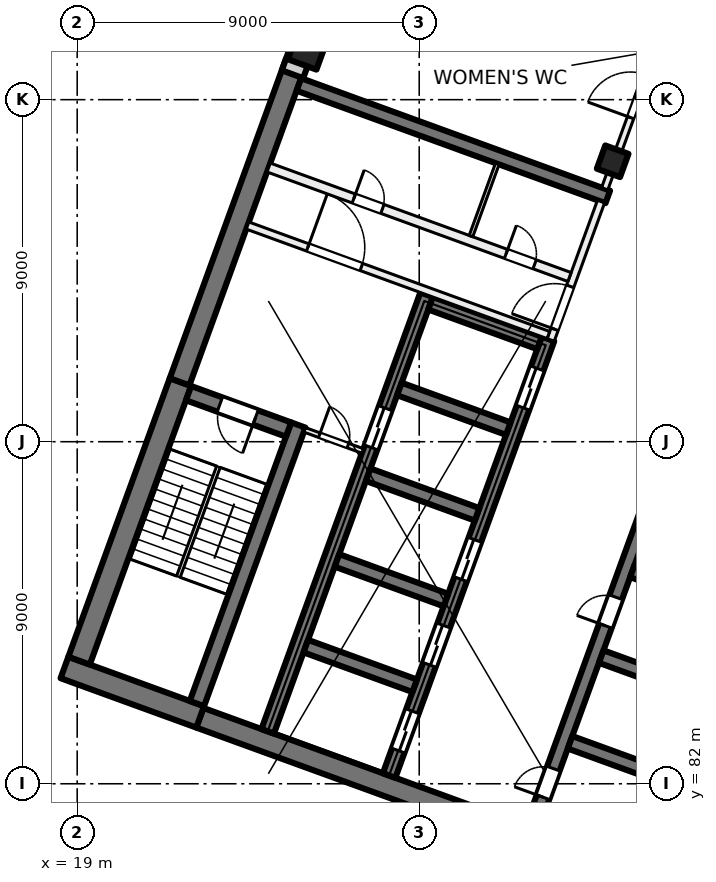
"""IFC4 building model, lengths in metres.
Left out: names, types, materials, properties, quantities, classifications, styles, units other than length and angle.
Written with IfcOpenShell. Run it as: python <this file> out.ifc"""

import sys

from ifc_helpers import new_model, si_unit, direction, frame, frame_2d, origin, origin_2d, place, context, subcontext, project, spatial, rectangle, extrude, element, fill, save


model = new_model("IFC4")
c1 = context("Model", 3, precision=1e-05, world=origin(), true_north=direction((0.0, 1.0)))
c2 = subcontext(c1, "Body", "Model", "MODEL_VIEW")
j1 = project(units=[si_unit("LENGTHUNIT", "METRE"), si_unit("PLANEANGLEUNIT", "RADIAN")], contexts=[c1])
p1 = place(None, origin())
s1 = spatial("IfcSite", under=j1, at=p1, CompositionType="ELEMENT")
p2 = place(p1, origin())
s2 = spatial("IfcBuilding", under=s1, at=p2, CompositionType="ELEMENT")
p3 = place(p2, frame((0.0, 0.0, 150.5)))
s3 = spatial("IfcBuildingStorey", under=s2, at=p3, CompositionType="ELEMENT", Elevation=150.5)
p4 = place(p3, frame((33.091, 98.379, 0.0), z_axis=(0.0, 0.0, 1.0), x_axis=(-0.342020143326, -0.939692620786, 0.0)))
e1 = element("IfcColumn", 1, at=p4, inside=s3, PredefinedType="COLUMN", context=c2, shape_type="SweptSolid", body=[
    extrude(rectangle(XDim=0.65, YDim=0.65, at=origin_2d()), origin(), (0.0, 0.0, 1.0), 4.0),
])
p5 = place(p3, frame((25.056, 101.303, 0.0), z_axis=(0.0, 0.0, 1.0), x_axis=(-0.342020143326, -0.939692620786, 0.0)))
e2 = element("IfcColumn", 2, at=p5, inside=s3, PredefinedType="COLUMN", context=c2, shape_type="SweptSolid", body=[
    extrude(rectangle(XDim=0.8, YDim=0.8, at=origin_2d()), origin(), (0.0, 0.0, 1.0), 4.0),
])
p6 = place(p3, frame((35.759, 78.811, 0.0), z_axis=(0.0, 0.0, 1.0), x_axis=(-0.939692894512, 0.342019391267, 0.0)))
e3 = element("IfcWall", 3, at=p6, inside=s3, PredefinedType="SHEAR", context=c2, shape_type="SweptSolid", body=[
    extrude(rectangle(XDim=14.4, YDim=0.55, at=frame_2d((7.2, 0.0))), origin(), (0.0, 0.0, 1.0), 4.0),
])
p7 = place(p3, frame((22.236, 83.76, 0.0), z_axis=(0.0, 0.0, 1.0), x_axis=(-0.939680822529, 0.342052557032, 0.0)))
e4 = element("IfcWall", 4, at=p7, inside=s3, PredefinedType="SHEAR", context=c2, shape_type="SweptSolid", body=[
    extrude(rectangle(XDim=3.8, YDim=0.6, at=frame_2d((1.9, 0.0))), origin(), (0.0, 0.0, 1.0), 4.0),
])
p8 = place(p3, frame((19.05, 85.239, 0.0), z_axis=(0.0, 0.0, 1.0), x_axis=(0.342016982193, 0.939693771338, 0.0)))
e5 = element("IfcWall", 5, at=p8, inside=s3, PredefinedType="SHEAR", context=c2, shape_type="SweptSolid", body=[
    extrude(rectangle(XDim=7.8, YDim=0.6, at=frame_2d((3.9, 0.0))), origin(), (0.0, 0.0, 1.0), 4.0),
])
p9 = place(p3, frame((21.694, 92.577, 0.0), z_axis=(0.0, 0.0, 1.0), x_axis=(0.342010253184, 0.939696220444, 0.0)))
e6 = element("IfcWall", 6, at=p9, inside=s3, PredefinedType="SHEAR", context=c2, shape_type="SweptSolid", body=[
    extrude(rectangle(XDim=8.95, YDim=0.55, at=frame_2d((4.475, 0.0))), origin(), (0.0, 0.0, 1.0), 4.0),
])
p10 = place(p3, frame((22.15, 84.11, 0.0), z_axis=(0.0, 0.0, 1.0), x_axis=(0.342016982193, 0.939693771338, 0.0)))
e7 = element("IfcWall", 7, at=p10, inside=s3, PredefinedType="SHEAR", context=c2, shape_type="SweptSolid", body=[
    extrude(rectangle(XDim=7.8, YDim=0.4, at=frame_2d((3.9, 0.0))), origin(), (0.0, 0.0, 1.0), 4.0),
])
p11 = place(p3, frame((24.562, 91.32, 0.0), z_axis=(0.0, 0.0, 1.0), x_axis=(-0.939717030584, 0.341953070509, 0.0)))
e8 = element("IfcWall", 8, at=p11, inside=s3, PredefinedType="SHEAR", context=c2, shape_type="SweptSolid", body=[
    extrude(rectangle(XDim=2.8, YDim=0.4, at=frame_2d((1.4, 0.0))), origin(), (0.0, 0.0, 1.0), 4.0),
])
p12 = place(p11, frame((0.925, 0.0, 0.0)))
e9 = element("IfcOpeningElement", 9, at=p12, cuts=e8, PredefinedType="OPENING", context=c2, shape_type="SweptSolid", body=[
    extrude(rectangle(XDim=1.0, YDim=2.1, at=frame_2d((0.5, 1.05))), frame((0.0, 0.21, 0.0), z_axis=(0.0, -1.0, 0.0), x_axis=(1.0, 0.0, 0.0)), (0.0, 0.0, 1.0), 0.42),
])
p13 = place(p3, frame((30.967, 80.848, 0.0), z_axis=(0.0, 0.0, 1.0), x_axis=(0.34201563943, 0.939694260058, 0.0)))
e10 = element("IfcWall", 10, at=p13, inside=s3, PredefinedType="SHEAR", context=c2, shape_type="SweptSolid", body=[
    extrude(rectangle(XDim=12.225, YDim=0.35, at=frame_2d((6.113, 0.0))), origin(), (0.0, 0.0, 1.0), 4.0),
])
p14 = place(p13, frame((0.85, 0.0, 0.0)))
e11 = element("IfcOpeningElement", 11, at=p14, cuts=e10, PredefinedType="OPENING", context=c2, shape_type="SweptSolid", body=[
    extrude(rectangle(XDim=0.8, YDim=2.1, at=frame_2d((0.4, 1.05))), frame((0.0, 0.185, 0.0), z_axis=(0.0, -1.0, 0.0), x_axis=(1.0, 0.0, 0.0)), (0.0, 0.0, 1.0), 0.37),
])
p15 = place(p13, frame((5.65, 0.0, 0.0)))
e12 = element("IfcOpeningElement", 12, at=p15, cuts=e10, PredefinedType="OPENING", context=c2, shape_type="SweptSolid", body=[
    extrude(rectangle(XDim=0.8, YDim=2.1, at=frame_2d((0.4, 1.05))), frame((0.0, 0.185, 0.0), z_axis=(0.0, -1.0, 0.0), x_axis=(1.0, 0.0, 0.0)), (0.0, 0.0, 1.0), 0.37),
])
p16 = place(p3, frame((34.835, 82.047, 0.0), z_axis=(0.0, 0.0, 1.0), x_axis=(-0.939683528043, 0.3420451244, 0.0)))
e13 = element("IfcWall", 13, at=p16, inside=s3, PredefinedType="SHEAR", context=c2, shape_type="SweptSolid", body=[
    extrude(rectangle(XDim=3.05, YDim=0.35, at=frame_2d((1.525, 0.0))), origin(), (0.0, 0.0, 1.0), 4.0),
])
p17 = place(p3, frame((35.656, 84.303, 0.0), z_axis=(0.0, 0.0, 1.0), x_axis=(-0.939709254651, 0.341974438698, 0.0)))
e14 = element("IfcWall", 14, at=p17, inside=s3, PredefinedType="SHEAR", context=c2, shape_type="SweptSolid", body=[
    extrude(rectangle(XDim=3.05, YDim=0.35, at=frame_2d((1.525, 0.0))), origin(), (0.0, 0.0, 1.0), 4.0),
])
p18 = place(p3, frame((36.477, 86.558, 0.0), z_axis=(0.0, 0.0, 1.0), x_axis=(-0.939683528043, 0.3420451244, 0.0)))
e15 = element("IfcWall", 15, at=p18, inside=s3, PredefinedType="SHEAR", context=c2, shape_type="SweptSolid", body=[
    extrude(rectangle(XDim=3.05, YDim=0.35, at=frame_2d((1.525, 0.0))), origin(), (0.0, 0.0, 1.0), 4.0),
])
p19 = place(p3, frame((27.208, 82.216, 0.0), z_axis=(0.0, 0.0, 1.0), x_axis=(0.34201563943, 0.939694260058, 0.0)))
e16 = element("IfcWall", 16, at=p19, inside=s3, PredefinedType="SHEAR", context=c2, shape_type="SweptSolid", body=[
    extrude(rectangle(XDim=12.225, YDim=0.35, at=frame_2d((6.113, 0.0))), origin(), (0.0, 0.0, 1.0), 4.0),
])
p20 = place(p19, frame((0.7, 0.0, 0.0)))
e17 = element("IfcOpeningElement", 17, at=p20, cuts=e16, PredefinedType="OPENING", context=c2, shape_type="SweptSolid", body=[
    extrude(rectangle(XDim=1.1, YDim=2.1, at=frame_2d((0.55, 1.05))), frame((0.0, 0.185, 0.0), z_axis=(0.0, -1.0, 0.0), x_axis=(1.0, 0.0, 0.0)), (0.0, 0.0, 1.0), 0.37),
])
p21 = place(p19, frame((3.1, 0.0, 0.0)))
e18 = element("IfcOpeningElement", 18, at=p21, cuts=e16, PredefinedType="OPENING", context=c2, shape_type="SweptSolid", body=[
    extrude(rectangle(XDim=1.1, YDim=2.1, at=frame_2d((0.55, 1.05))), frame((0.0, 0.185, 0.0), z_axis=(0.0, -1.0, 0.0), x_axis=(1.0, 0.0, 0.0)), (0.0, 0.0, 1.0), 0.37),
])
p22 = place(p19, frame((5.5, 0.0, 0.0)))
e19 = element("IfcOpeningElement", 19, at=p22, cuts=e16, PredefinedType="OPENING", context=c2, shape_type="SweptSolid", body=[
    extrude(rectangle(XDim=1.1, YDim=2.1, at=frame_2d((0.55, 1.05))), frame((0.0, 0.185, 0.0), z_axis=(0.0, -1.0, 0.0), x_axis=(1.0, 0.0, 0.0)), (0.0, 0.0, 1.0), 0.37),
])
p23 = place(p19, frame((10.3, 0.0, 0.0)))
e20 = element("IfcOpeningElement", 20, at=p23, cuts=e16, PredefinedType="OPENING", context=c2, shape_type="SweptSolid", body=[
    extrude(rectangle(XDim=1.1, YDim=2.1, at=frame_2d((0.55, 1.05))), frame((0.0, 0.185, 0.0), z_axis=(0.0, -1.0, 0.0), x_axis=(1.0, 0.0, 0.0)), (0.0, 0.0, 1.0), 0.37),
])
p24 = place(p3, frame((24.013, 83.379, 0.0), z_axis=(0.0, 0.0, 1.0), x_axis=(0.34201563943, 0.939694260058, 0.0)))
e21 = element("IfcWall", 21, at=p24, inside=s3, PredefinedType="SHEAR", context=c2, shape_type="SweptSolid", body=[
    extrude(rectangle(XDim=12.225, YDim=0.35, at=frame_2d((6.113, 0.0))), origin(), (0.0, 0.0, 1.0), 4.0),
])
p25 = place(p24, frame((7.95, 0.0, 0.0)))
e22 = element("IfcOpeningElement", 22, at=p25, cuts=e21, PredefinedType="OPENING", context=c2, shape_type="SweptSolid", body=[
    extrude(rectangle(XDim=1.1, YDim=2.1, at=frame_2d((0.55, 1.05))), frame((0.0, 0.185, 0.0), z_axis=(0.0, -1.0, 0.0), x_axis=(1.0, 0.0, 0.0)), (0.0, 0.0, 1.0), 0.37),
])
for number, where, z_axis, x_axis in (
    (23, (27.881, 84.578, 0.0), (0.0, 0.0, 1.0), (-0.94, 0.342, 0.0)),
    (24, (28.702, 86.833, 0.0), (0.0, 0.0, 1.0), (-0.94, 0.342, 0.0)),
    (25, (29.523, 89.089, 0.0), (0.0, 0.0, 1.0), (-0.94, 0.342, 0.0)),
):
    element("IfcWall", number, at=place(p3, frame(where, z_axis=z_axis, x_axis=x_axis)), inside=s3, PredefinedType="SHEAR", context=c2, shape_type="SweptSolid", body=[
        extrude(rectangle(XDim=3.05, YDim=0.35, at=frame_2d((1.525, 0.0))), origin(), (0.0, 0.0, 1.0), 4.0),
    ])
p26 = place(p3, frame((30.344, 91.344, 0.0), z_axis=(0.0, 0.0, 1.0), x_axis=(-0.939709254651, 0.341974438698, 0.0)))
e26 = element("IfcWall", 26, at=p26, inside=s3, PredefinedType="SHEAR", context=c2, shape_type="SweptSolid", body=[
    extrude(rectangle(XDim=3.05, YDim=0.35, at=frame_2d((1.525, 0.0))), origin(), (0.0, 0.0, 1.0), 4.0),
])
p27 = place(p3, frame((31.165, 93.599, 0.0), z_axis=(0.0, 0.0, 1.0), x_axis=(-0.939683528043, 0.3420451244, 0.0)))
e27 = element("IfcWall", 27, at=p27, inside=s3, PredefinedType="SHEAR", context=c2, shape_type="SweptSolid", body=[
    extrude(rectangle(XDim=3.05, YDim=0.35, at=frame_2d((1.525, 0.0))), origin(), (0.0, 0.0, 1.0), 4.0),
])
p28 = place(p3, frame((32.962, 97.441, 0.0), z_axis=(0.0, 0.0, 1.0), x_axis=(-0.939689545667, 0.342028592028, 0.0)))
e28 = element("IfcWall", 28, at=p28, inside=s3, PredefinedType="SHEAR", context=c2, shape_type="SweptSolid", body=[
    extrude(rectangle(XDim=8.65, YDim=0.35, at=frame_2d((4.325, 0.0))), origin(), (0.0, 0.0, 1.0), 4.0),
])
p29 = place(p3, frame((24.666, 100.669, 0.0), z_axis=(0.0, 0.0, 1.0), x_axis=(0.34201964167, 0.939692803373, 0.0)))
e29 = element("IfcWall", 29, at=p29, inside=s3, PredefinedType="SOLIDWALL", context=c2, shape_type="SweptSolid", body=[
    extrude(rectangle(XDim=32.884, YDim=0.6, at=frame_2d((16.442, 0.0))), origin(), (0.0, 0.0, 1.0), 3.625),
])
p30 = place(p29, frame((1.48, 0.0, 0.9)))
e30 = element("IfcOpeningElement", 30, at=p30, cuts=e29, PredefinedType="OPENING", context=c2, shape_type="SweptSolid", body=[
    extrude(rectangle(XDim=3.0, YDim=2.4, at=frame_2d((1.5, 1.2))), frame((0.0, 0.31, 0.0), z_axis=(0.0, -1.0, 0.0), x_axis=(1.0, 0.0, 0.0)), (0.0, 0.0, 1.0), 0.62),
])
p31 = place(p29, frame((5.98, 0.0, 0.9)))
e31 = element("IfcOpeningElement", 31, at=p31, cuts=e29, PredefinedType="OPENING", context=c2, shape_type="SweptSolid", body=[
    extrude(rectangle(XDim=3.0, YDim=2.4, at=frame_2d((1.5, 1.2))), frame((0.0, 0.31, 0.0), z_axis=(0.0, -1.0, 0.0), x_axis=(1.0, 0.0, 0.0)), (0.0, 0.0, 1.0), 0.62),
])
p32 = place(p29, frame((10.48, 0.0, 0.9)))
e32 = element("IfcOpeningElement", 32, at=p32, cuts=e29, PredefinedType="OPENING", context=c2, shape_type="SweptSolid", body=[
    extrude(rectangle(XDim=3.0, YDim=2.4, at=frame_2d((1.5, 1.2))), frame((0.0, 0.31, 0.0), z_axis=(0.0, -1.0, 0.0), x_axis=(1.0, 0.0, 0.0)), (0.0, 0.0, 1.0), 0.62),
])
p33 = place(p29, frame((14.98, 0.0, 0.9)))
e33 = element("IfcOpeningElement", 33, at=p33, cuts=e29, PredefinedType="OPENING", context=c2, shape_type="SweptSolid", body=[
    extrude(rectangle(XDim=3.0, YDim=2.4, at=frame_2d((1.5, 1.2))), frame((0.0, 0.31, 0.0), z_axis=(0.0, -1.0, 0.0), x_axis=(1.0, 0.0, 0.0)), (0.0, 0.0, 1.0), 0.62),
])
p34 = place(p29, frame((19.48, 0.0, 0.9)))
e34 = element("IfcOpeningElement", 34, at=p34, cuts=e29, PredefinedType="OPENING", context=c2, shape_type="SweptSolid", body=[
    extrude(rectangle(XDim=3.0, YDim=2.4, at=frame_2d((1.5, 1.2))), frame((0.0, 0.31, 0.0), z_axis=(0.0, -1.0, 0.0), x_axis=(1.0, 0.0, 0.0)), (0.0, 0.0, 1.0), 0.62),
])
p35 = place(p29, frame((23.98, 0.0, 0.9)))
e35 = element("IfcOpeningElement", 35, at=p35, cuts=e29, PredefinedType="OPENING", context=c2, shape_type="SweptSolid", body=[
    extrude(rectangle(XDim=3.0, YDim=2.4, at=frame_2d((1.5, 1.2))), frame((0.0, 0.31, 0.0), z_axis=(0.0, -1.0, 0.0), x_axis=(1.0, 0.0, 0.0)), (0.0, 0.0, 1.0), 0.62),
])
p36 = place(p29, frame((28.48, 0.0, 0.9)))
e36 = element("IfcOpeningElement", 36, at=p36, cuts=e29, PredefinedType="OPENING", context=c2, shape_type="SweptSolid", body=[
    extrude(rectangle(XDim=3.0, YDim=2.4, at=frame_2d((1.5, 1.2))), frame((0.0, 0.31, 0.0), z_axis=(0.0, -1.0, 0.0), x_axis=(1.0, 0.0, 0.0)), (0.0, 0.0, 1.0), 0.62),
])
p37 = place(p3, frame((31.459, 93.678, 0.0), z_axis=(0.0, 0.0, 1.0), x_axis=(0.341985870128, 0.939705094502, 0.0)))
e37 = element("IfcWall", 37, at=p37, inside=s3, PredefinedType="PARTITIONING", context=c2, shape_type="SweptSolid", body=[
    extrude(rectangle(XDim=3.875, YDim=0.2, at=frame_2d((1.938, 0.0))), origin(), (0.0, 0.0, 1.0), 3.625),
])
p38 = place(p37, frame((0.3, 0.0, 0.0)))
e38 = element("IfcOpeningElement", 38, at=p38, cuts=e37, PredefinedType="OPENING", context=c2, shape_type="SweptSolid", body=[
    extrude(rectangle(XDim=1.2, YDim=2.1, at=frame_2d((0.6, 1.05))), frame((0.0, 0.11, 0.0), z_axis=(0.0, -1.0, 0.0), x_axis=(1.0, 0.0, 0.0)), (0.0, 0.0, 1.0), 0.22),
])
p39 = place(p3, frame((23.483, 96.688, 0.0), z_axis=(0.0, 0.0, 1.0), x_axis=(0.939691007314, -0.342024576271, 0.0)))
e39 = element("IfcWall", 39, at=p39, inside=s3, PredefinedType="PARTITIONING", context=c2, shape_type="SweptSolid", body=[
    extrude(rectangle(XDim=8.425, YDim=0.2, at=frame_2d((4.212, 0.0))), origin(), (0.0, 0.0, 1.0), 3.625),
])
p40 = place(p39, frame((1.688, 0.0, 0.0)))
e40 = element("IfcOpeningElement", 40, at=p40, cuts=e39, PredefinedType="OPENING", context=c2, shape_type="SweptSolid", body=[
    extrude(rectangle(XDim=1.5, YDim=2.1, at=frame_2d((0.75, 1.05))), frame((0.0, 0.11, 0.0), z_axis=(0.0, -1.0, 0.0), x_axis=(1.0, 0.0, 0.0)), (0.0, 0.0, 1.0), 0.22),
])
p41 = place(p3, frame((24.039, 98.215, 0.0), z_axis=(0.0, 0.0, 1.0), x_axis=(0.939687617333, -0.342033889887, 0.0)))
e41 = element("IfcWall", 41, at=p41, inside=s3, PredefinedType="PARTITIONING", context=c2, shape_type="SweptSolid", body=[
    extrude(rectangle(XDim=8.425, YDim=0.25, at=frame_2d((4.212, 0.0))), origin(), (0.0, 0.0, 1.0), 3.625),
])
p42 = place(p41, frame((6.647, 0.0, 0.0)))
e42 = element("IfcOpeningElement", 42, at=p42, cuts=e41, PredefinedType="OPENING", context=c2, shape_type="SweptSolid", body=[
    extrude(rectangle(XDim=0.8, YDim=2.1, at=frame_2d((0.4, 1.05))), frame((0.0, 0.135, 0.0), z_axis=(0.0, -1.0, 0.0), x_axis=(1.0, 0.0, 0.0)), (0.0, 0.0, 1.0), 0.27),
])
p43 = place(p41, frame((2.385, 0.0, 0.0)))
e43 = element("IfcOpeningElement", 43, at=p43, cuts=e41, PredefinedType="OPENING", context=c2, shape_type="SweptSolid", body=[
    extrude(rectangle(XDim=0.8, YDim=2.1, at=frame_2d((0.4, 1.05))), frame((0.0, 0.135, 0.0), z_axis=(0.0, -1.0, 0.0), x_axis=(1.0, 0.0, 0.0)), (0.0, 0.0, 1.0), 0.27),
])
p44 = place(p3, frame((24.985, 91.312, 0.0), z_axis=(0.0, 0.0, 1.0), x_axis=(0.939705651352, -0.341984340019, 0.0)))
e44 = element("IfcWall", 44, at=p44, inside=s3, PredefinedType="PARTITIONING", context=c2, shape_type="SweptSolid", body=[
    extrude(rectangle(XDim=1.625, YDim=0.125, at=frame_2d((0.812, 0.0))), origin(), (0.0, 0.0, 1.0), 3.625),
])
p45 = place(p44, frame((0.413, 0.0, 0.0)))
e45 = element("IfcOpeningElement", 45, at=p45, cuts=e44, PredefinedType="OPENING", context=c2, shape_type="SweptSolid", body=[
    extrude(rectangle(XDim=0.8, YDim=2.1, at=frame_2d((0.4, 1.05))), frame((0.0, 0.073, 0.0), z_axis=(0.0, -1.0, 0.0), x_axis=(1.0, 0.0, 0.0)), (0.0, 0.0, 1.0), 0.145),
])
p46 = place(p3, frame((29.362, 96.41, 0.0), z_axis=(0.0, 0.0, 1.0), x_axis=(0.342043138314, 0.939684250976, 0.0)))
e46 = element("IfcWall", 46, at=p46, inside=s3, PredefinedType="PARTITIONING", context=c2, shape_type="SweptSolid", body=[
    extrude(rectangle(XDim=2.025, YDim=0.1, at=frame_2d((1.012, 0.0))), origin(), (0.0, 0.0, 1.0), 3.625),
])
p47 = place(p3, frame((32.881, 97.657, 0.0), z_axis=(0.0, 0.0, 1.0), x_axis=(0.342058204353, 0.939678766832, 0.0)))
e47 = element("IfcWall", 47, at=p47, inside=s3, PredefinedType="PARTITIONING", context=c2, shape_type="SweptSolid", body=[
    extrude(rectangle(XDim=5.163, YDim=0.175, at=frame_2d((2.581, 0.0))), origin(), (0.0, 0.0, 1.0), 3.625),
])
p48 = place(p47, frame((1.991, 0.0, 0.0)))
e48 = element("IfcOpeningElement", 48, at=p48, cuts=e47, PredefinedType="OPENING", context=c2, shape_type="SweptSolid", body=[
    extrude(rectangle(XDim=1.2, YDim=2.1, at=frame_2d((0.6, 1.05))), frame((0.0, 0.097, 0.0), z_axis=(0.0, -1.0, 0.0), x_axis=(1.0, 0.0, 0.0)), (0.0, 0.0, 1.0), 0.195),
])
p49 = place(p20, origin())
e49 = element("IfcDoor", 49, at=p49, inside=s3, OperationType="DOUBLE_DOOR_SLIDING", PredefinedType="DOOR", context=c2, shape_type="SweptSolid", body=[
    extrude(rectangle(XDim=1.1, YDim=2.1, at=frame_2d((0.55, 1.05))), frame((0.0, 0.025, 0.0), z_axis=(0.0, -1.0, 0.0), x_axis=(1.0, 0.0, 0.0)), (0.0, 0.0, 1.0), 0.05),
])
fill(e17, e49)
p50 = place(p21, origin())
e50 = element("IfcDoor", 50, at=p50, inside=s3, OperationType="DOUBLE_DOOR_SLIDING", PredefinedType="DOOR", context=c2, shape_type="SweptSolid", body=[
    extrude(rectangle(XDim=1.1, YDim=2.1, at=frame_2d((0.55, 1.05))), frame((0.0, 0.025, 0.0), z_axis=(0.0, -1.0, 0.0), x_axis=(1.0, 0.0, 0.0)), (0.0, 0.0, 1.0), 0.05),
])
fill(e18, e50)
p51 = place(p22, origin())
e51 = element("IfcDoor", 51, at=p51, inside=s3, OperationType="DOUBLE_DOOR_SLIDING", PredefinedType="DOOR", context=c2, shape_type="SweptSolid", body=[
    extrude(rectangle(XDim=1.1, YDim=2.1, at=frame_2d((0.55, 1.05))), frame((0.0, 0.025, 0.0), z_axis=(0.0, -1.0, 0.0), x_axis=(1.0, 0.0, 0.0)), (0.0, 0.0, 1.0), 0.05),
])
fill(e19, e51)
p52 = place(p23, origin())
e52 = element("IfcDoor", 52, at=p52, inside=s3, OperationType="DOUBLE_DOOR_SLIDING", PredefinedType="DOOR", context=c2, shape_type="SweptSolid", body=[
    extrude(rectangle(XDim=1.1, YDim=2.1, at=frame_2d((0.55, 1.05))), frame((0.0, 0.025, 0.0), z_axis=(0.0, -1.0, 0.0), x_axis=(1.0, 0.0, 0.0)), (0.0, 0.0, 1.0), 0.05),
])
fill(e20, e52)
p53 = place(p14, origin())
e53 = element("IfcDoor", 53, at=p53, inside=s3, OperationType="SINGLE_SWING_LEFT", PredefinedType="DOOR", context=c2, shape_type="SweptSolid", body=[
    extrude(rectangle(XDim=0.8, YDim=2.1, at=frame_2d((0.4, 1.05))), frame((0.0, 0.025, 0.0), z_axis=(0.0, -1.0, 0.0), x_axis=(1.0, 0.0, 0.0)), (0.0, 0.0, 1.0), 0.05),
])
fill(e11, e53)
p54 = place(p15, origin())
e54 = element("IfcDoor", 54, at=p54, inside=s3, OperationType="SINGLE_SWING_RIGHT", PredefinedType="DOOR", context=c2, shape_type="SweptSolid", body=[
    extrude(rectangle(XDim=0.8, YDim=2.1, at=frame_2d((0.4, 1.05))), frame((0.0, 0.025, 0.0), z_axis=(0.0, -1.0, 0.0), x_axis=(1.0, 0.0, 0.0)), (0.0, 0.0, 1.0), 0.05),
])
fill(e12, e54)
p55 = place(p38, origin())
e55 = element("IfcDoor", 55, at=p55, inside=s3, OperationType="DOUBLE_DOOR_SINGLE_SWING", PredefinedType="DOOR", context=c2, shape_type="SweptSolid", body=[
    extrude(rectangle(XDim=1.2, YDim=2.1, at=frame_2d((0.6, 1.05))), frame((0.0, 0.025, 0.0), z_axis=(0.0, -1.0, 0.0), x_axis=(1.0, 0.0, 0.0)), (0.0, 0.0, 1.0), 0.05),
])
fill(e38, e55)
p56 = place(p40, origin())
e56 = element("IfcDoor", 56, at=p56, inside=s3, OperationType="DOUBLE_DOOR_SINGLE_SWING", PredefinedType="DOOR", context=c2, shape_type="SweptSolid", body=[
    extrude(rectangle(XDim=1.5, YDim=2.1, at=frame_2d((0.75, 1.05))), frame((0.0, 0.025, 0.0), z_axis=(0.0, -1.0, 0.0), x_axis=(1.0, 0.0, 0.0)), (0.0, 0.0, 1.0), 0.05),
])
fill(e40, e56)
p57 = place(p12, origin())
e57 = element("IfcDoor", 57, at=p57, inside=s3, OperationType="SINGLE_SWING_LEFT", PredefinedType="DOOR", context=c2, shape_type="SweptSolid", body=[
    extrude(rectangle(XDim=1.0, YDim=2.1, at=frame_2d((0.5, 1.05))), frame((0.0, 0.025, 0.0), z_axis=(0.0, -1.0, 0.0), x_axis=(1.0, 0.0, 0.0)), (0.0, 0.0, 1.0), 0.05),
])
fill(e9, e57)
p58 = place(p45, origin())
e58 = element("IfcDoor", 58, at=p58, inside=s3, OperationType="SINGLE_SWING_RIGHT", PredefinedType="DOOR", context=c2, shape_type="SweptSolid", body=[
    extrude(rectangle(XDim=0.8, YDim=2.1, at=frame_2d((0.4, 1.05))), frame((0.0, 0.025, 0.0), z_axis=(0.0, -1.0, 0.0), x_axis=(1.0, 0.0, 0.0)), (0.0, 0.0, 1.0), 0.05),
])
fill(e45, e58)
p59 = place(p42, origin())
e59 = element("IfcDoor", 59, at=p59, inside=s3, OperationType="SINGLE_SWING_LEFT", PredefinedType="DOOR", context=c2, shape_type="SweptSolid", body=[
    extrude(rectangle(XDim=0.8, YDim=2.1, at=frame_2d((0.4, 1.05))), frame((0.0, 0.025, 0.0), z_axis=(0.0, -1.0, 0.0), x_axis=(1.0, 0.0, 0.0)), (0.0, 0.0, 1.0), 0.05),
])
fill(e42, e59)
p60 = place(p43, origin())
e60 = element("IfcDoor", 60, at=p60, inside=s3, OperationType="SINGLE_SWING_RIGHT", PredefinedType="DOOR", context=c2, shape_type="SweptSolid", body=[
    extrude(rectangle(XDim=0.8, YDim=2.1, at=frame_2d((0.4, 1.05))), frame((0.0, 0.025, 0.0), z_axis=(0.0, -1.0, 0.0), x_axis=(1.0, 0.0, 0.0)), (0.0, 0.0, 1.0), 0.05),
])
fill(e43, e60)
p61 = place(p25, origin())
e61 = element("IfcDoor", 61, at=p61, inside=s3, OperationType="DOUBLE_DOOR_SLIDING", PredefinedType="DOOR", context=c2, shape_type="SweptSolid", body=[
    extrude(rectangle(XDim=1.1, YDim=2.1, at=frame_2d((0.55, 1.05))), frame((0.0, 0.025, 0.0), z_axis=(0.0, -1.0, 0.0), x_axis=(1.0, 0.0, 0.0)), (0.0, 0.0, 1.0), 0.05),
])
fill(e22, e61)
p62 = place(p48, origin())
e62 = element("IfcDoor", 62, at=p62, inside=s3, OperationType="DOUBLE_DOOR_SINGLE_SWING", PredefinedType="DOOR", context=c2, shape_type="SweptSolid", body=[
    extrude(rectangle(XDim=1.2, YDim=2.1, at=frame_2d((0.6, 1.05))), frame((0.0, 0.025, 0.0), z_axis=(0.0, -1.0, 0.0), x_axis=(1.0, 0.0, 0.0)), (0.0, 0.0, 1.0), 0.05),
])
fill(e48, e62)
save(model, sys.argv[1])
